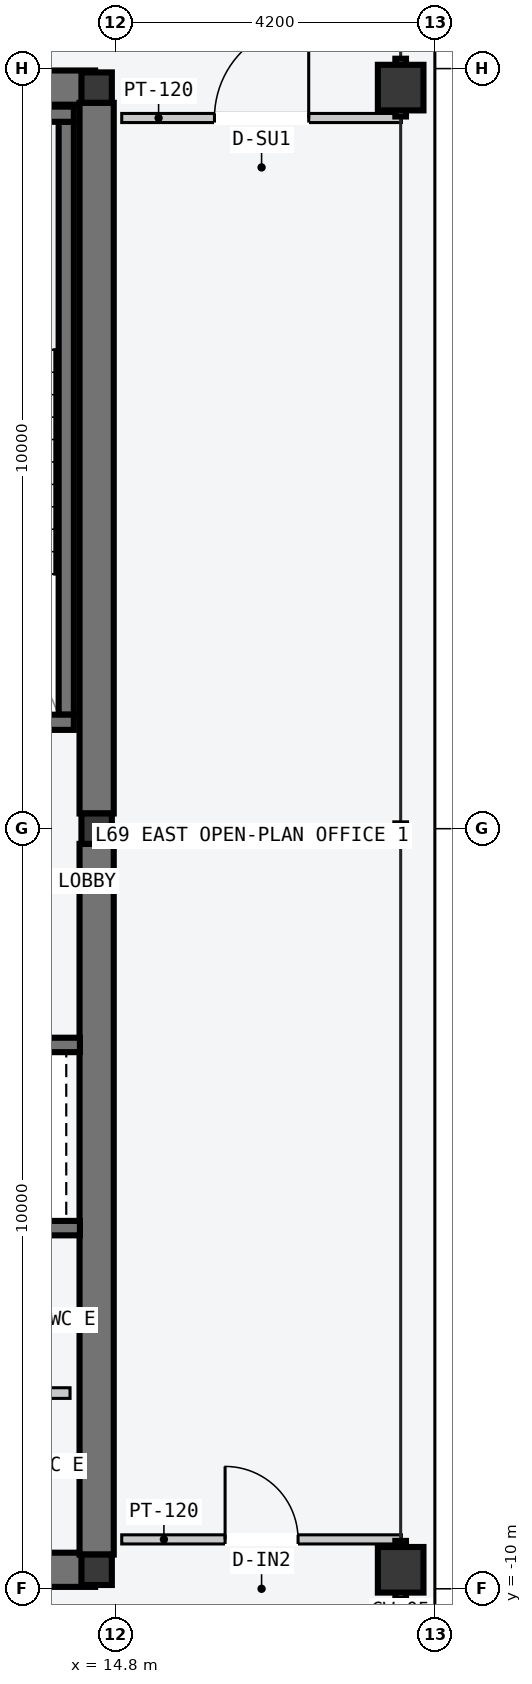
"""IFC4 building model, lengths in metres.
Left out: names, types, materials, properties, quantities, classifications, styles, units other than length and angle.
Written with IfcOpenShell. Run it as: python <this file> out.ifc"""

import sys

from ifc_helpers import new_model, si_unit, direction, frame, frame_2d, origin, origin_2d, place, context, subcontext, project, spatial, rectangle, hollow_rectangle, i_section, extrude, element, fill, save


model = new_model("IFC4")
c1 = context("Model", 3, precision=1e-05, world=origin(), true_north=direction((0.0, 1.0)))
c2 = subcontext(c1, "Body", "Model", "MODEL_VIEW")
j1 = project(units=[si_unit("LENGTHUNIT", "METRE"), si_unit("PLANEANGLEUNIT", "RADIAN")], contexts=[c1])
p1 = place(None, origin())
s1 = spatial("IfcSite", under=j1, at=p1, CompositionType="ELEMENT")
p2 = place(p1, origin())
s2 = spatial("IfcBuilding", under=s1, at=p2, CompositionType="ELEMENT")
p3 = place(p2, frame((0.0, 0.0, 261.6)))
s3 = spatial("IfcBuildingStorey", under=s2, at=p3, CompositionType="ELEMENT", Elevation=261.6)
for number, where, z_axis, x_axis in (
    (1, (8.07, -9.75, -0.2), (0.0, 0.0, 1.0), (1.0, 0.0, 0.0)),
    (2, (8.07, 9.75, -0.2), (0.0, 0.0, 1.0), (1.0, 0.0, 0.0)),
):
    element("IfcWall", number, at=place(p3, frame(where, z_axis=z_axis, x_axis=x_axis)), inside=s3, PredefinedType="SHEAR", context=c2, shape_type="SweptSolid", body=[
        extrude(rectangle(XDim=6.46, YDim=0.45, at=frame_2d((3.23, 0.0))), origin(), (0.0, 0.0, 1.0), 3.6),
    ])
for number, where, z_axis, x_axis in (
    (3, (14.55, -9.55, -0.2), (0.0, 0.0, 1.0), (0.0, 1.0, 0.0)),
    (4, (14.55, 0.2, -0.2), (0.0, 0.0, 1.0), (0.0, 1.0, 0.0)),
):
    element("IfcWall", number, at=place(p3, frame(where, z_axis=z_axis, x_axis=x_axis)), inside=s3, PredefinedType="SHEAR", context=c2, shape_type="SweptSolid", body=[
        extrude(rectangle(XDim=9.35, YDim=0.45, at=frame_2d((4.675, 0.0))), origin(), (0.0, 0.0, 1.0), 3.6),
    ])
p4 = place(p3, frame((14.15, 1.5, -0.2), z_axis=(0.0, 0.0, 1.0), x_axis=(0.0, 1.0, 0.0)))
e5 = element("IfcWall", 5, at=p4, inside=s3, PredefinedType="SOLIDWALL", context=c2, shape_type="SweptSolid", body=[
    extrude(rectangle(XDim=7.8, YDim=0.2, at=frame_2d((3.9, 0.0))), origin(), (0.0, 0.0, 1.0), 3.6),
])
p5 = place(p3, frame((10.53, 1.4, -0.2), z_axis=(0.0, 0.0, 1.0), x_axis=(1.0, 0.0, 0.0)))
e6 = element("IfcWall", 6, at=p5, inside=s3, PredefinedType="SOLIDWALL", context=c2, shape_type="SweptSolid", body=[
    extrude(rectangle(XDim=3.72, YDim=0.2, at=frame_2d((1.86, 0.0))), origin(), (0.0, 0.0, 1.0), 3.6),
])
p6 = place(p5, frame((1.5, 0.0, 0.2)))
e7 = element("IfcOpeningElement", 7, at=p6, cuts=e6, PredefinedType="OPENING", context=c2, shape_type="SweptSolid", body=[
    extrude(rectangle(XDim=1.12, YDim=2.18, at=frame_2d((0.56, 1.09))), frame((0.0, 0.11, 0.0), z_axis=(0.0, -1.0, 0.0), x_axis=(1.0, 0.0, 0.0)), (0.0, 0.0, 1.0), 0.22),
])
p7 = place(p3, frame((10.53, 9.4, -0.2), z_axis=(0.0, 0.0, 1.0), x_axis=(1.0, 0.0, 0.0)))
e8 = element("IfcWall", 8, at=p7, inside=s3, PredefinedType="SOLIDWALL", context=c2, shape_type="SweptSolid", body=[
    extrude(rectangle(XDim=3.72, YDim=0.2, at=frame_2d((1.86, 0.0))), origin(), (0.0, 0.0, 1.0), 3.6),
])
for number, where, z_axis, x_axis in (
    (9, (14.55, -9.75, 0.0), (0.0, 0.0, 1.0), (1.0, 0.0, 0.0)),
    (10, (14.55, 0.0, 0.0), (0.0, 0.0, 1.0), (1.0, 0.0, 0.0)),
    (11, (14.55, 9.75, 0.0), (0.0, 0.0, 1.0), (1.0, 0.0, 0.0)),
):
    element("IfcColumn", number, at=place(p3, frame(where, z_axis=z_axis, x_axis=x_axis)), inside=s3, PredefinedType="COLUMN", context=c2, shape_type="SweptSolid", body=[
        extrude(i_section(OverallWidth=0.4, OverallDepth=0.4, WebThickness=0.013, FlangeThickness=0.021, at=origin_2d()), origin(), (0.0, 0.0, 1.0), 3.6),
    ])
for number, where, z_axis, x_axis in (
    (12, (18.55, -9.75, 0.0), (0.0, 0.0, 1.0), (0.0, 1.0, 0.0)),
    (13, (18.55, 9.75, 0.0), (0.0, 0.0, 1.0), (0.0, 1.0, 0.0)),
):
    element("IfcColumn", number, at=place(p3, frame(where, z_axis=z_axis, x_axis=x_axis)), inside=s3, PredefinedType="COLUMN", context=c2, shape_type="SweptSolid", body=[
        extrude(hollow_rectangle(XDim=0.6, YDim=0.6, WallThickness=0.025, at=origin_2d()), origin(), (0.0, 0.0, 1.0), 3.6),
    ])
p8 = place(p3, frame((11.65, -2.845, -0.2), z_axis=(0.0, 0.0, 1.0), x_axis=(1.0, 0.0, 0.0)))
e14 = element("IfcWall", 14, at=p8, inside=s3, PredefinedType="SOLIDWALL", context=c2, shape_type="SweptSolid", body=[
    extrude(rectangle(XDim=2.68, YDim=0.19, at=frame_2d((1.34, 0.0))), origin(), (0.0, 0.0, 1.0), 3.6),
])
p9 = place(p8, frame((0.65, 0.0, 0.2)))
e15 = element("IfcOpeningElement", 15, at=p9, cuts=e14, PredefinedType="OPENING", context=c2, shape_type="SweptSolid", body=[
    extrude(rectangle(XDim=1.2, YDim=2.2, at=frame_2d((0.6, 1.1))), frame((0.0, 0.105, 0.0), z_axis=(0.0, -1.0, 0.0), x_axis=(1.0, 0.0, 0.0)), (0.0, 0.0, 1.0), 0.21),
])
p10 = place(p3, frame((11.65, -5.255, -0.2), z_axis=(0.0, 0.0, 1.0), x_axis=(1.0, 0.0, 0.0)))
e16 = element("IfcWall", 16, at=p10, inside=s3, PredefinedType="SOLIDWALL", context=c2, shape_type="SweptSolid", body=[
    extrude(rectangle(XDim=2.68, YDim=0.19, at=frame_2d((1.34, 0.0))), origin(), (0.0, 0.0, 1.0), 3.6),
])
p11 = place(p3, frame((11.7, -7.425, 0.0), z_axis=(0.0, 0.0, 1.0), x_axis=(1.0, 0.0, 0.0)))
e17 = element("IfcWall", 17, at=p11, inside=s3, PredefinedType="PARTITIONING", context=c2, shape_type="SweptSolid", body=[
    extrude(rectangle(XDim=2.5, YDim=0.14, at=frame_2d((1.25, 0.0))), origin(), (0.0, 0.0, 1.0), 3.4),
])
p12 = place(p3, frame((14.88, 9.35, 0.0), z_axis=(0.0, 0.0, 1.0), x_axis=(1.0, 0.0, 0.0)))
e18 = element("IfcWall", 18, at=p12, inside=s3, PredefinedType="PARTITIONING", context=c2, shape_type="SweptSolid", body=[
    extrude(rectangle(XDim=3.68, YDim=0.12, at=frame_2d((1.84, 0.0))), origin(), (0.0, 0.0, 1.0), 3.4),
])
p13 = place(p12, frame((1.22, 0.0, 0.0)))
e19 = element("IfcOpeningElement", 19, at=p13, cuts=e18, PredefinedType="OPENING", context=c2, shape_type="SweptSolid", body=[
    extrude(rectangle(XDim=1.24, YDim=2.24, at=frame_2d((0.62, 1.12))), frame((0.0, 0.07, 0.0), z_axis=(0.0, -1.0, 0.0), x_axis=(1.0, 0.0, 0.0)), (0.0, 0.0, 1.0), 0.14),
])
p14 = place(p3, frame((14.88, -9.35, 0.0), z_axis=(0.0, 0.0, 1.0), x_axis=(1.0, 0.0, 0.0)))
e20 = element("IfcWall", 20, at=p14, inside=s3, PredefinedType="PARTITIONING", context=c2, shape_type="SweptSolid", body=[
    extrude(rectangle(XDim=3.68, YDim=0.12, at=frame_2d((1.84, 0.0))), origin(), (0.0, 0.0, 1.0), 3.4),
])
p15 = place(p14, frame((1.36, 0.0, 0.0)))
e21 = element("IfcOpeningElement", 21, at=p15, cuts=e20, PredefinedType="OPENING", context=c2, shape_type="SweptSolid", body=[
    extrude(rectangle(XDim=0.96, YDim=2.18, at=frame_2d((0.48, 1.09))), frame((0.0, 0.07, 0.0), z_axis=(0.0, -1.0, 0.0), x_axis=(1.0, 0.0, 0.0)), (0.0, 0.0, 1.0), 0.14),
])
p16 = place(p13, origin())
e22 = element("IfcDoor", 22, at=p16, inside=s3, OperationType="SINGLE_SWING_RIGHT", PredefinedType="DOOR", context=c2, shape_type="SweptSolid", body=[
    extrude(rectangle(XDim=1.24, YDim=2.24, at=frame_2d((0.62, 1.12))), frame((0.0, 0.025, 0.0), z_axis=(0.0, -1.0, 0.0), x_axis=(1.0, 0.0, 0.0)), (0.0, 0.0, 1.0), 0.05),
])
fill(e19, e22)
p17 = place(p15, origin())
e23 = element("IfcDoor", 23, at=p17, inside=s3, OperationType="SINGLE_SWING_LEFT", PredefinedType="DOOR", context=c2, shape_type="SweptSolid", body=[
    extrude(rectangle(XDim=0.96, YDim=2.18, at=frame_2d((0.48, 1.09))), frame((0.0, 0.025, 0.0), z_axis=(0.0, -1.0, 0.0), x_axis=(1.0, 0.0, 0.0)), (0.0, 0.0, 1.0), 0.05),
])
fill(e21, e23)
save(model, sys.argv[1])
